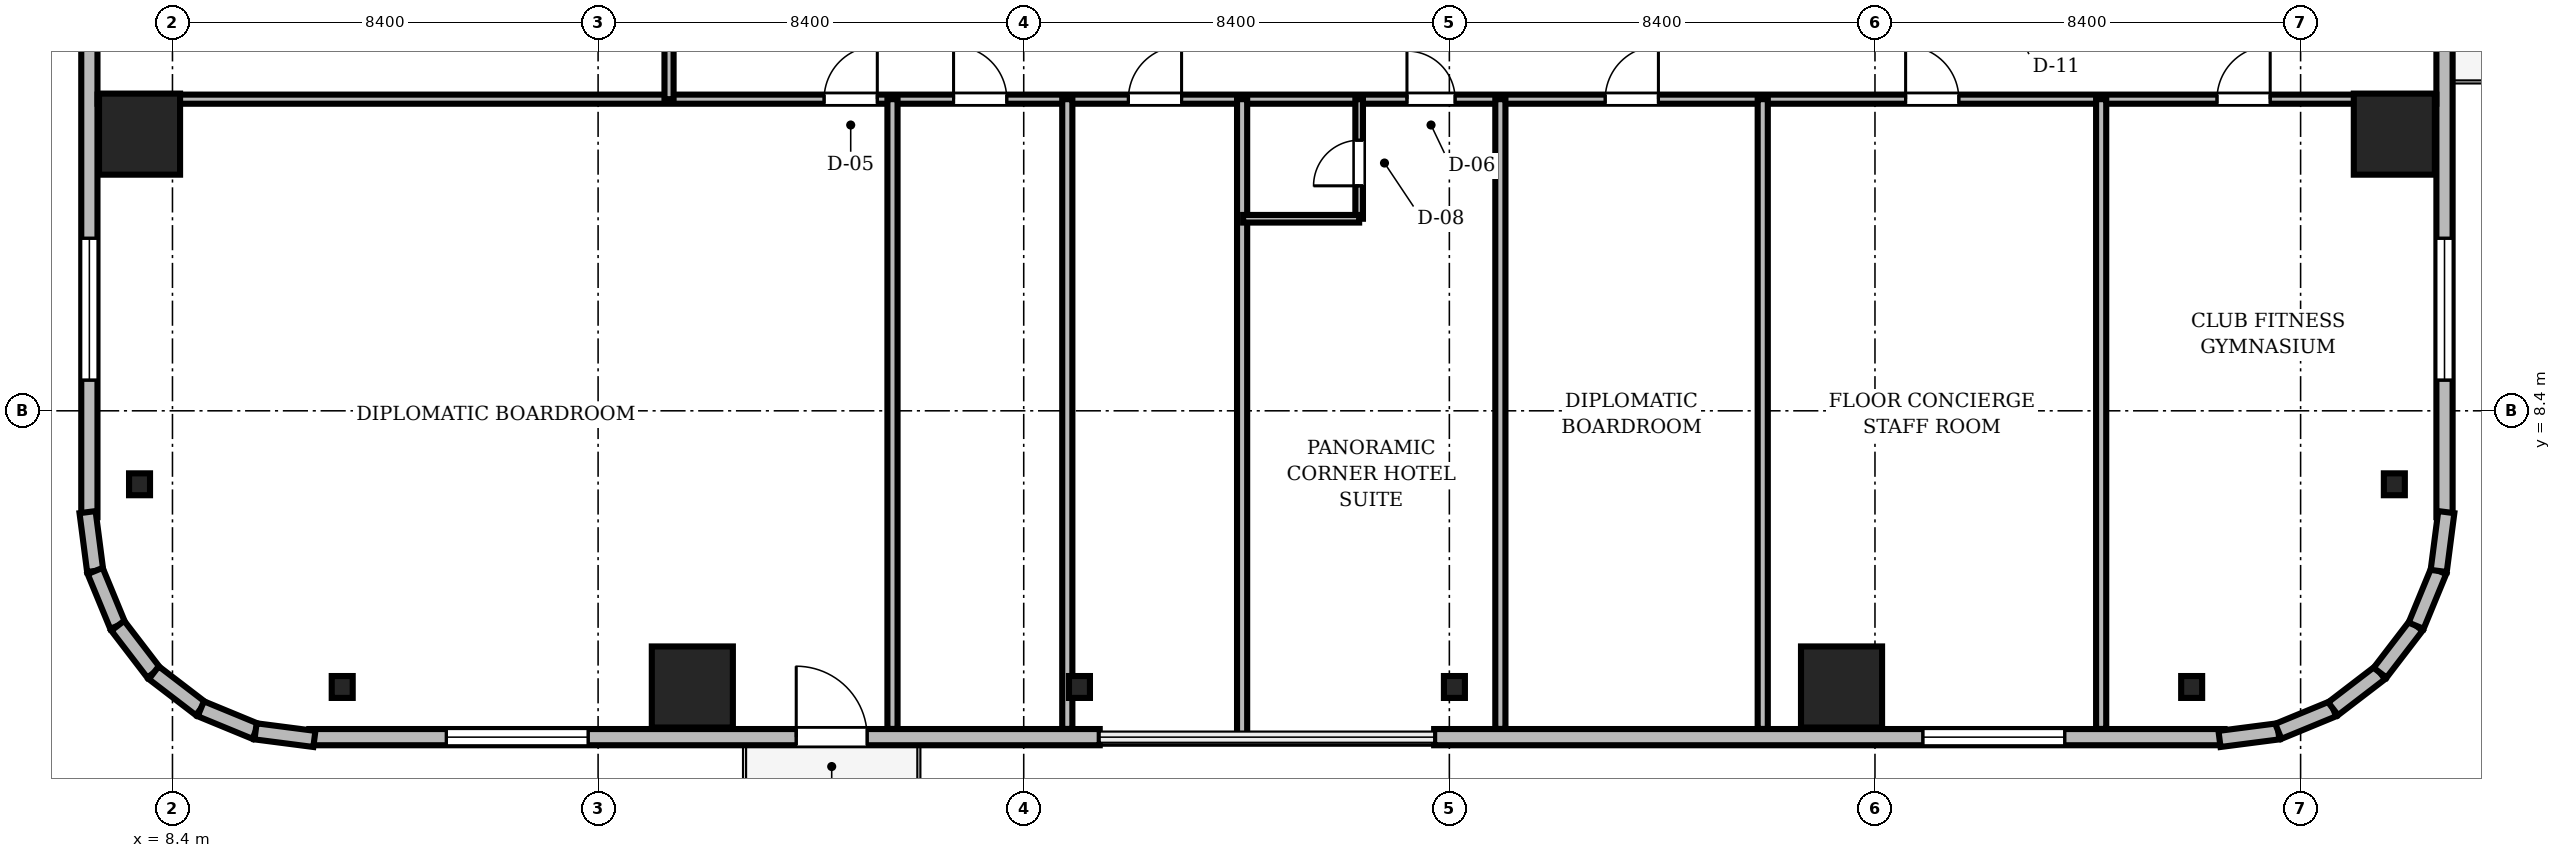
"""IFC4 building model, lengths in metres.
Left out: names, types, materials, properties, quantities, classifications, styles, units other than length and angle.
Written with IfcOpenShell. Run it as: python <this file> out.ifc"""

import sys

from ifc_helpers import new_model, si_unit, direction, frame, frame_2d, origin, origin_2d, place, context, subcontext, project, spatial, rectangle, i_section, extrude, source, transform, mapped, element, fill, save


model = new_model("IFC4")
c1 = context("Model", 3, precision=1e-05, world=origin(), true_north=direction((0.0, 1.0)))
c2 = subcontext(c1, "Body", "Model", "MODEL_VIEW")
j1 = project(units=[si_unit("LENGTHUNIT", "METRE"), si_unit("PLANEANGLEUNIT", "RADIAN")], contexts=[c1])
p1 = place(None, origin())
s1 = spatial("IfcSite", under=j1, at=p1, CompositionType="ELEMENT")
p2 = place(p1, origin())
s2 = spatial("IfcBuilding", under=s1, at=p2, CompositionType="ELEMENT")
p3 = place(p2, frame((0.0, 0.0, 103.7)))
s3 = spatial("IfcBuildingStorey", under=s2, at=p3, CompositionType="ELEMENT", Elevation=103.7)
m1 = source(origin(), c2, "Body", "SweptSolid", [
    extrude(rectangle(XDim=1.6, YDim=1.6, at=origin_2d()), origin(), (0.0, 0.0, 1.0), 3.56),
])
for number, where, z_axis, x_axis in (
    (1, (18.66, 2.95, 0.0), (0.0, 0.0, 1.0), (1.0, 0.0, 0.0)),
    (2, (41.34, 2.95, 0.0), (0.0, 0.0, 1.0), (1.0, 0.0, 0.0)),
    (3, (52.25, 13.86, 0.0), (0.0, 0.0, 1.0), (1.0, 0.0, 0.0)),
    (4, (7.75, 13.86, 0.0), (0.0, 0.0, 1.0), (1.0, 0.0, 0.0)),
):
    element("IfcColumn", number, at=place(p3, frame(where, z_axis=z_axis, x_axis=x_axis)), inside=s3, PredefinedType="COLUMN", context=c2, shape_type="MappedRepresentation", body=[
        mapped(m1, transform((0.0, 0.0, 0.0), scale=1.0)),
    ])
m2 = source(origin(), c2, "Body", "SweptSolid", [
    extrude(i_section(OverallWidth=0.414, OverallDepth=0.432, WebThickness=0.026, FlangeThickness=0.04, FilletRadius=0.015, at=origin_2d()), origin(), (0.0, 0.0, 1.0), 3.56),
])
for number, where, z_axis, x_axis in (
    (5, (11.75, 2.95, 0.0), (0.0, 0.0, 1.0), (1.0, 0.0, 0.0)),
    (6, (26.3, 2.95, 0.0), (0.0, 0.0, 1.0), (1.0, 0.0, 0.0)),
    (7, (33.7, 2.95, 0.0), (0.0, 0.0, 1.0), (1.0, 0.0, 0.0)),
    (8, (48.25, 2.95, 0.0), (0.0, 0.0, 1.0), (1.0, 0.0, 0.0)),
    (9, (52.25, 6.95, 0.0), (0.0, 0.0, 1.0), (1.0, 0.0, 0.0)),
    (10, (7.75, 6.95, 0.0), (0.0, 0.0, 1.0), (1.0, 0.0, 0.0)),
):
    element("IfcColumn", number, at=place(p3, frame(where, z_axis=z_axis, x_axis=x_axis)), inside=s3, PredefinedType="COLUMN", context=c2, shape_type="MappedRepresentation", body=[
        mapped(m2, transform((0.0, 0.0, 0.0), scale=1.0)),
    ])
m3 = source(origin(), c2, "Body", "SweptSolid", [
    extrude(rectangle(XDim=15.6, YDim=0.32, at=frame_2d((7.8, 0.0))), origin(), (0.0, 0.0, 1.0), 3.56),
])
p4 = place(p3, frame((11.1, 1.96, 0.0), z_axis=(0.0, 0.0, 1.0), x_axis=(1.0, 0.0, 0.0)))
e11 = element("IfcWall", 11, at=p4, inside=s3, PredefinedType="SOLIDWALL", context=c2, shape_type="MappedRepresentation", body=[
    mapped(m3, transform((0.0, 0.0, 0.0), scale=1.0)),
])
m4 = source(origin(), c2, "Body", "SweptSolid", [
    extrude(rectangle(XDim=1.4, YDim=2.3, at=frame_2d((0.7, 1.15))), frame((0.0, 0.17, 0.0), z_axis=(0.0, -1.0, 0.0), x_axis=(1.0, 0.0, 0.0)), (0.0, 0.0, 1.0), 0.34),
])
p5 = place(p4, frame((9.61, 0.0, 0.0)))
e12 = element("IfcOpeningElement", 12, at=p5, cuts=e11, PredefinedType="OPENING", context=c2, shape_type="MappedRepresentation", body=[
    mapped(m4, transform((0.0, 0.0, 0.0), scale=1.0)),
])
m5 = source(origin(), c2, "Body", "SweptSolid", [
    extrude(rectangle(XDim=2.8, YDim=2.4, at=frame_2d((1.4, 1.2))), frame((0.0, 0.17, 0.0), z_axis=(0.0, -1.0, 0.0), x_axis=(1.0, 0.0, 0.0)), (0.0, 0.0, 1.0), 0.34),
])
p6 = place(p4, frame((2.705, 0.0, 0.72)))
e13 = element("IfcOpeningElement", 13, at=p6, cuts=e11, PredefinedType="OPENING", context=c2, shape_type="MappedRepresentation", body=[
    mapped(m5, transform((0.0, 0.0, 0.0), scale=1.0)),
])
p7 = place(p3, frame((33.3, 1.96, 0.0), z_axis=(0.0, 0.0, 1.0), x_axis=(1.0, 0.0, 0.0)))
e14 = element("IfcWall", 14, at=p7, inside=s3, PredefinedType="SOLIDWALL", context=c2, shape_type="MappedRepresentation", body=[
    mapped(m3, transform((0.0, 0.0, 0.0), scale=1.0)),
])
p8 = place(p7, frame((9.645, 0.0, 0.72)))
e15 = element("IfcOpeningElement", 15, at=p8, cuts=e14, PredefinedType="OPENING", context=c2, shape_type="MappedRepresentation", body=[
    mapped(m5, transform((0.0, 0.0, 0.0), scale=1.0)),
])
p9 = place(p3, frame((6.76, 21.9, 0.0), z_axis=(0.0, 0.0, 1.0), x_axis=(0.0, -1.0, 0.0)))
e16 = element("IfcWall", 16, at=p9, inside=s3, PredefinedType="SOLIDWALL", context=c2, shape_type="MappedRepresentation", body=[
    mapped(m3, transform((0.0, 0.0, 0.0), scale=1.0)),
])
p10 = place(p9, frame((10.095, 0.0, 0.72)))
e17 = element("IfcOpeningElement", 17, at=p10, cuts=e16, PredefinedType="OPENING", context=c2, shape_type="MappedRepresentation", body=[
    mapped(m5, transform((0.0, 0.0, 0.0), scale=1.0)),
])
p11 = place(p3, frame((53.24, 6.3, 0.0), z_axis=(0.0, 0.0, 1.0), x_axis=(0.0, 1.0, 0.0)))
e18 = element("IfcWall", 18, at=p11, inside=s3, PredefinedType="SOLIDWALL", context=c2, shape_type="MappedRepresentation", body=[
    mapped(m3, transform((0.0, 0.0, 0.0), scale=1.0)),
])
p12 = place(p11, frame((9.61, 0.0, 0.0)))
e19 = element("IfcOpeningElement", 19, at=p12, cuts=e18, PredefinedType="OPENING", context=c2, shape_type="MappedRepresentation", body=[
    mapped(m4, transform((0.0, 0.0, 0.0), scale=1.0)),
])
p13 = place(p11, frame((2.705, 0.0, 0.72)))
e20 = element("IfcOpeningElement", 20, at=p13, cuts=e18, PredefinedType="OPENING", context=c2, shape_type="MappedRepresentation", body=[
    mapped(m5, transform((0.0, 0.0, 0.0), scale=1.0)),
])
m6 = source(origin(), c2, "Body", "SweptSolid", [
    extrude(rectangle(XDim=1.171, YDim=0.32, at=frame_2d((0.585, 0.0))), origin(), (0.0, 0.0, 1.0), 3.56),
])
p14 = place(p3, frame((6.724, 6.401, 0.0), z_axis=(0.0, 0.0, 1.0), x_axis=(0.128269133229, -0.991739395941, 0.0)))
e21 = element("IfcWall", 21, at=p14, inside=s3, PredefinedType="SOLIDWALL", context=c2, shape_type="MappedRepresentation", body=[
    mapped(m6, transform((0.0, 0.0, 0.0), scale=1.0)),
])
m7 = source(origin(), c2, "Body", "SweptSolid", [
    extrude(rectangle(XDim=1.169, YDim=0.32, at=frame_2d((0.584, 0.0))), origin(), (0.0, 0.0, 1.0), 3.56),
])
for number, where, z_axis, x_axis in (
    (22, (6.875, 5.24, 0.0), (0.0, 0.0, 1.0), (0.381, -0.925, 0.0)),
    (23, (7.32, 4.159, 0.0), (0.0, 0.0, 1.0), (0.608, -0.794, 0.0)),
):
    element("IfcWall", number, at=place(p3, frame(where, z_axis=z_axis, x_axis=x_axis)), inside=s3, PredefinedType="SOLIDWALL", context=c2, shape_type="MappedRepresentation", body=[
        mapped(m7, transform((0.0, 0.0, 0.0), scale=1.0)),
    ])
m8 = source(origin(), c2, "Body", "SweptSolid", [
    extrude(rectangle(XDim=1.169, YDim=0.32, at=frame_2d((0.584, 0.0))), origin(), (0.0, 0.0, 1.0), 3.56),
])
p15 = place(p3, frame((8.031, 3.231, 0.0), z_axis=(0.0, 0.0, 1.0), x_axis=(0.793663520347, -0.608356981114, 0.0)))
e24 = element("IfcWall", 24, at=p15, inside=s3, PredefinedType="SOLIDWALL", context=c2, shape_type="MappedRepresentation", body=[
    mapped(m8, transform((0.0, 0.0, 0.0), scale=1.0)),
])
m9 = source(origin(), c2, "Body", "SweptSolid", [
    extrude(rectangle(XDim=1.169, YDim=0.32, at=frame_2d((0.585, 0.0))), origin(), (0.0, 0.0, 1.0), 3.56),
])
p16 = place(p3, frame((8.959, 2.52, 0.0), z_axis=(0.0, 0.0, 1.0), x_axis=(0.924479075121, -0.381232789334, 0.0)))
e25 = element("IfcWall", 25, at=p16, inside=s3, PredefinedType="SOLIDWALL", context=c2, shape_type="MappedRepresentation", body=[
    mapped(m9, transform((0.0, 0.0, 0.0), scale=1.0)),
])
m10 = source(origin(), c2, "Body", "SweptSolid", [
    extrude(rectangle(XDim=1.17, YDim=0.32, at=frame_2d((0.585, 0.0))), origin(), (0.0, 0.0, 1.0), 3.56),
])
for number, where, z_axis, x_axis in (
    (26, (10.04, 2.074, 0.0), (0.0, 0.0, 1.0), (0.992, -0.128, 0.0)),
    (27, (48.8, 1.925, 0.0), (0.0, 0.0, 1.0), (0.992, 0.128, 0.0)),
):
    element("IfcWall", number, at=place(p3, frame(where, z_axis=z_axis, x_axis=x_axis)), inside=s3, PredefinedType="SOLIDWALL", context=c2, shape_type="MappedRepresentation", body=[
        mapped(m10, transform((0.0, 0.0, 0.0), scale=1.0)),
    ])
p17 = place(p3, frame((49.96, 2.074, 0.0), z_axis=(0.0, 0.0, 1.0), x_axis=(0.924479075121, 0.381232789334, 0.0)))
e28 = element("IfcWall", 28, at=p17, inside=s3, PredefinedType="SOLIDWALL", context=c2, shape_type="MappedRepresentation", body=[
    mapped(m9, transform((0.0, 0.0, 0.0), scale=1.0)),
])
p18 = place(p3, frame((51.041, 2.52, 0.0), z_axis=(0.0, 0.0, 1.0), x_axis=(0.793663520347, 0.608356981114, 0.0)))
e29 = element("IfcWall", 29, at=p18, inside=s3, PredefinedType="SOLIDWALL", context=c2, shape_type="MappedRepresentation", body=[
    mapped(m8, transform((0.0, 0.0, 0.0), scale=1.0)),
])
for number, where, z_axis, x_axis in (
    (30, (51.969, 3.231, 0.0), (0.0, 0.0, 1.0), (0.608, 0.794, 0.0)),
    (31, (52.68, 4.159, 0.0), (0.0, 0.0, 1.0), (0.381, 0.925, 0.0)),
):
    element("IfcWall", number, at=place(p3, frame(where, z_axis=z_axis, x_axis=x_axis)), inside=s3, PredefinedType="SOLIDWALL", context=c2, shape_type="MappedRepresentation", body=[
        mapped(m7, transform((0.0, 0.0, 0.0), scale=1.0)),
    ])
p19 = place(p3, frame((53.125, 5.24, 0.0), z_axis=(0.0, 0.0, 1.0), x_axis=(0.128269133229, 0.991739395941, 0.0)))
e32 = element("IfcWall", 32, at=p19, inside=s3, PredefinedType="SOLIDWALL", context=c2, shape_type="MappedRepresentation", body=[
    mapped(m6, transform((0.0, 0.0, 0.0), scale=1.0)),
])
m11 = source(origin(), c2, "Body", "SweptSolid", [
    extrude(rectangle(XDim=46.156, YDim=0.18, at=frame_2d((23.078, 0.0))), origin(), (0.0, 0.0, 1.0), 2.802),
])
p20 = place(p3, frame((6.922, 14.55, 0.0), z_axis=(0.0, 0.0, 1.0), x_axis=(1.0, 0.0, 0.0)))
e33 = element("IfcWall", 33, at=p20, inside=s3, PredefinedType="PARTITIONING", context=c2, shape_type="MappedRepresentation", body=[
    mapped(m11, transform((0.0, 0.0, 0.0), scale=1.0)),
])
m12 = source(origin(), c2, "Body", "SweptSolid", [
    extrude(rectangle(XDim=1.05, YDim=2.2, at=frame_2d((0.525, 1.1))), frame((0.0, 0.1, 0.0), z_axis=(0.0, -1.0, 0.0), x_axis=(1.0, 0.0, 0.0)), (0.0, 0.0, 1.0), 0.2),
])
p21 = place(p20, frame((14.338, 0.0, 0.0)))
e34 = element("IfcOpeningElement", 34, at=p21, cuts=e33, PredefinedType="OPENING", context=c2, shape_type="MappedRepresentation", body=[
    mapped(m12, transform((0.0, 0.0, 0.0), scale=1.0)),
])
p22 = place(p20, frame((16.893, 0.0, 0.0)))
e35 = element("IfcOpeningElement", 35, at=p22, cuts=e33, PredefinedType="OPENING", context=c2, shape_type="MappedRepresentation", body=[
    mapped(m12, transform((0.0, 0.0, 0.0), scale=1.0)),
])
p23 = place(p20, frame((20.344, 0.0, 0.0)))
e36 = element("IfcOpeningElement", 36, at=p23, cuts=e33, PredefinedType="OPENING", context=c2, shape_type="MappedRepresentation", body=[
    mapped(m12, transform((0.0, 0.0, 0.0), scale=1.0)),
])
m13 = source(origin(), c2, "Body", "SweptSolid", [
    extrude(rectangle(XDim=0.95, YDim=2.15, at=frame_2d((0.475, 1.075))), frame((0.0, 0.1, 0.0), z_axis=(0.0, -1.0, 0.0), x_axis=(1.0, 0.0, 0.0)), (0.0, 0.0, 1.0), 0.2),
])
p24 = place(p20, frame((25.842, 0.0, 0.0)))
e37 = element("IfcOpeningElement", 37, at=p24, cuts=e33, PredefinedType="OPENING", context=c2, shape_type="MappedRepresentation", body=[
    mapped(m13, transform((0.0, 0.0, 0.0), scale=1.0)),
])
p25 = place(p20, frame((29.754, 0.0, 0.0)))
e38 = element("IfcOpeningElement", 38, at=p25, cuts=e33, PredefinedType="OPENING", context=c2, shape_type="MappedRepresentation", body=[
    mapped(m12, transform((0.0, 0.0, 0.0), scale=1.0)),
])
p26 = place(p20, frame((35.683, 0.0, 0.0)))
e39 = element("IfcOpeningElement", 39, at=p26, cuts=e33, PredefinedType="OPENING", context=c2, shape_type="MappedRepresentation", body=[
    mapped(m12, transform((0.0, 0.0, 0.0), scale=1.0)),
])
p27 = place(p20, frame((41.828, 0.0, 0.0)))
e40 = element("IfcOpeningElement", 40, at=p27, cuts=e33, PredefinedType="OPENING", context=c2, shape_type="MappedRepresentation", body=[
    mapped(m12, transform((0.0, 0.0, 0.0), scale=1.0)),
])
m14 = source(origin(), c2, "Body", "SweptSolid", [
    extrude(rectangle(XDim=2.36, YDim=0.15, at=frame_2d((1.18, 0.0))), origin(), (0.0, 0.0, 1.0), 3.56),
])
p28 = place(p3, frame((31.82, 12.19, 0.0), z_axis=(0.0, 0.0, 1.0), x_axis=(0.0, 1.0, 0.0)))
e41 = element("IfcWall", 41, at=p28, inside=s3, PredefinedType="PARTITIONING", context=c2, shape_type="MappedRepresentation", body=[
    mapped(m14, transform((0.0, 0.0, 0.0), scale=1.0)),
])
m15 = source(origin(), c2, "Body", "SweptSolid", [
    extrude(rectangle(XDim=0.9, YDim=2.1, at=frame_2d((0.45, 1.05))), frame((0.0, 0.085, 0.0), z_axis=(0.0, -1.0, 0.0), x_axis=(1.0, 0.0, 0.0)), (0.0, 0.0, 1.0), 0.17),
])
p29 = place(p28, frame((0.65, 0.0, 0.0)))
e42 = element("IfcOpeningElement", 42, at=p29, cuts=e41, PredefinedType="OPENING", context=c2, shape_type="MappedRepresentation", body=[
    mapped(m15, transform((0.0, 0.0, 0.0), scale=1.0)),
])
m16 = source(origin(), c2, "Body", "SweptSolid", [
    extrude(rectangle(XDim=14.0, YDim=0.18, at=frame_2d((7.0, 0.0))), origin(), (0.0, 0.0, 1.0), 2.952),
])
p30 = place(p3, frame((18.2, 14.55, 0.0), z_axis=(0.0, 0.0, 1.0), x_axis=(0.0, 1.0, 0.0)))
e43 = element("IfcWall", 43, at=p30, inside=s3, PredefinedType="PARTITIONING", context=c2, shape_type="MappedRepresentation", body=[
    mapped(m16, transform((0.0, 0.0, 0.0), scale=1.0)),
])
m17 = source(origin(), c2, "Body", "SweptSolid", [
    extrude(rectangle(XDim=12.428, YDim=0.2, at=frame_2d((6.214, 0.0))), origin(), (0.0, 0.0, 1.0), 2.802),
])
for number, where, z_axis, x_axis in (
    (44, (22.61, 2.122, 0.0), (0.0, 0.0, 1.0), (0.0, 1.0, 0.0)),
    (45, (26.06, 2.122, 0.0), (0.0, 0.0, 1.0), (0.0, 1.0, 0.0)),
):
    element("IfcWall", number, at=place(p3, frame(where, z_axis=z_axis, x_axis=x_axis)), inside=s3, PredefinedType="PARTITIONING", context=c2, shape_type="MappedRepresentation", body=[
        mapped(m17, transform((0.0, 0.0, 0.0), scale=1.0)),
    ])
m18 = source(origin(), c2, "Body", "SweptSolid", [
    extrude(rectangle(XDim=12.62, YDim=0.2, at=frame_2d((6.31, 0.0))), origin(), (0.0, 0.0, 1.0), 2.802),
])
p31 = place(p3, frame((29.51, 1.93, 0.0), z_axis=(0.0, 0.0, 1.0), x_axis=(0.0, 1.0, 0.0)))
e46 = element("IfcWall", 46, at=p31, inside=s3, PredefinedType="PARTITIONING", context=c2, shape_type="MappedRepresentation", body=[
    mapped(m18, transform((0.0, 0.0, 0.0), scale=1.0)),
])
for number, where, z_axis, x_axis in (
    (47, (34.607, 2.122, 0.0), (0.0, 0.0, 1.0), (0.0, 1.0, 0.0)),
    (48, (39.785, 2.122, 0.0), (0.0, 0.0, 1.0), (0.0, 1.0, 0.0)),
    (49, (46.464, 2.122, 0.0), (0.0, 0.0, 1.0), (0.0, 1.0, 0.0)),
):
    element("IfcWall", number, at=place(p3, frame(where, z_axis=z_axis, x_axis=x_axis)), inside=s3, PredefinedType="PARTITIONING", context=c2, shape_type="MappedRepresentation", body=[
        mapped(m17, transform((0.0, 0.0, 0.0), scale=1.0)),
    ])
m19 = source(origin(), c2, "Body", "SweptSolid", [
    extrude(rectangle(XDim=2.29, YDim=0.15, at=frame_2d((1.145, 0.0))), origin(), (0.0, 0.0, 1.0), 2.952),
])
p32 = place(p3, frame((29.53, 12.19, 0.0), z_axis=(0.0, 0.0, 1.0), x_axis=(1.0, 0.0, 0.0)))
e50 = element("IfcWall", 50, at=p32, inside=s3, PredefinedType="PARTITIONING", context=c2, shape_type="MappedRepresentation", body=[
    mapped(m19, transform((0.0, 0.0, 0.0), scale=1.0)),
])
m20 = source(origin(), c2, "Body", "SweptSolid", [
    extrude(rectangle(XDim=1.4, YDim=2.3, at=frame_2d((0.7, 1.15))), frame((0.0, 0.025, 0.0), z_axis=(0.0, -1.0, 0.0), x_axis=(1.0, 0.0, 0.0)), (0.0, 0.0, 1.0), 0.05),
])
p33 = place(p5, frame((1.4, 0.0, 0.0), z_axis=(0.0, 0.0, 1.0), x_axis=(-1.0, 0.0, 0.0)))
e51 = element("IfcDoor", 51, at=p33, inside=s3, OperationType="DOUBLE_DOOR_SLIDING", PredefinedType="DOOR", context=c2, shape_type="MappedRepresentation", body=[
    mapped(m20, transform((0.0, 0.0, 0.0), scale=1.0)),
])
fill(e12, e51)
m21 = source(origin(), c2, "Body", "SweptSolid", [
    extrude(rectangle(XDim=2.8, YDim=2.4, at=frame_2d((1.4, 1.2))), frame((0.0, 0.03, 0.0), z_axis=(0.0, -1.0, 0.0), x_axis=(1.0, 0.0, 0.0)), (0.0, 0.0, 1.0), 0.06),
])
p34 = place(p6, origin())
e52 = element("IfcWindow", 52, at=p34, inside=s3, PartitioningType="SINGLE_PANEL", PredefinedType="WINDOW", context=c2, shape_type="MappedRepresentation", body=[
    mapped(m21, transform((0.0, 0.0, 0.0), scale=1.0)),
])
fill(e13, e52)
p35 = place(p8, origin())
e53 = element("IfcWindow", 53, at=p35, inside=s3, PartitioningType="SINGLE_PANEL", PredefinedType="WINDOW", context=c2, shape_type="MappedRepresentation", body=[
    mapped(m21, transform((0.0, 0.0, 0.0), scale=1.0)),
])
fill(e15, e53)
p36 = place(p10, origin())
e54 = element("IfcWindow", 54, at=p36, inside=s3, PartitioningType="SINGLE_PANEL", PredefinedType="WINDOW", context=c2, shape_type="MappedRepresentation", body=[
    mapped(m21, transform((0.0, 0.0, 0.0), scale=1.0)),
])
fill(e17, e54)
p37 = place(p13, origin())
e55 = element("IfcWindow", 55, at=p37, inside=s3, PartitioningType="SINGLE_PANEL", PredefinedType="WINDOW", context=c2, shape_type="MappedRepresentation", body=[
    mapped(m21, transform((0.0, 0.0, 0.0), scale=1.0)),
])
fill(e20, e55)
m22 = source(origin(), c2, "Body", "SweptSolid", [
    extrude(rectangle(XDim=1.05, YDim=2.2, at=frame_2d((0.525, 1.1))), frame((0.0, 0.025, 0.0), z_axis=(0.0, -1.0, 0.0), x_axis=(1.0, 0.0, 0.0)), (0.0, 0.0, 1.0), 0.05),
])
p38 = place(p21, origin())
e56 = element("IfcDoor", 56, at=p38, inside=s3, OperationType="SINGLE_SWING_RIGHT", PredefinedType="DOOR", context=c2, shape_type="MappedRepresentation", body=[
    mapped(m22, transform((0.0, 0.0, 0.0), scale=1.0)),
])
fill(e34, e56)
p39 = place(p22, origin())
e57 = element("IfcDoor", 57, at=p39, inside=s3, OperationType="SINGLE_SWING_LEFT", PredefinedType="DOOR", context=c2, shape_type="MappedRepresentation", body=[
    mapped(m22, transform((0.0, 0.0, 0.0), scale=1.0)),
])
fill(e35, e57)
p40 = place(p23, origin())
e58 = element("IfcDoor", 58, at=p40, inside=s3, OperationType="SINGLE_SWING_RIGHT", PredefinedType="DOOR", context=c2, shape_type="MappedRepresentation", body=[
    mapped(m22, transform((0.0, 0.0, 0.0), scale=1.0)),
])
fill(e36, e58)
m23 = source(origin(), c2, "Body", "SweptSolid", [
    extrude(rectangle(XDim=0.95, YDim=2.15, at=frame_2d((0.475, 1.075))), frame((0.0, 0.025, 0.0), z_axis=(0.0, -1.0, 0.0), x_axis=(1.0, 0.0, 0.0)), (0.0, 0.0, 1.0), 0.05),
])
p41 = place(p24, origin())
e59 = element("IfcDoor", 59, at=p41, inside=s3, OperationType="SINGLE_SWING_LEFT", PredefinedType="DOOR", context=c2, shape_type="MappedRepresentation", body=[
    mapped(m23, transform((0.0, 0.0, 0.0), scale=1.0)),
])
fill(e37, e59)
p42 = place(p25, origin())
e60 = element("IfcDoor", 60, at=p42, inside=s3, OperationType="SINGLE_SWING_RIGHT", PredefinedType="DOOR", context=c2, shape_type="MappedRepresentation", body=[
    mapped(m22, transform((0.0, 0.0, 0.0), scale=1.0)),
])
fill(e38, e60)
p43 = place(p26, origin())
e61 = element("IfcDoor", 61, at=p43, inside=s3, OperationType="SINGLE_SWING_LEFT", PredefinedType="DOOR", context=c2, shape_type="MappedRepresentation", body=[
    mapped(m22, transform((0.0, 0.0, 0.0), scale=1.0)),
])
fill(e39, e61)
p44 = place(p27, origin())
e62 = element("IfcDoor", 62, at=p44, inside=s3, OperationType="SINGLE_SWING_RIGHT", PredefinedType="DOOR", context=c2, shape_type="MappedRepresentation", body=[
    mapped(m22, transform((0.0, 0.0, 0.0), scale=1.0)),
])
fill(e40, e62)
m24 = source(origin(), c2, "Body", "SweptSolid", [
    extrude(rectangle(XDim=0.9, YDim=2.1, at=frame_2d((0.45, 1.05))), frame((0.0, 0.025, 0.0), z_axis=(0.0, -1.0, 0.0), x_axis=(1.0, 0.0, 0.0)), (0.0, 0.0, 1.0), 0.05),
])
p45 = place(p29, origin())
e63 = element("IfcDoor", 63, at=p45, inside=s3, OperationType="SINGLE_SWING_LEFT", PredefinedType="DOOR", context=c2, shape_type="MappedRepresentation", body=[
    mapped(m24, transform((0.0, 0.0, 0.0), scale=1.0)),
])
fill(e42, e63)
save(model, sys.argv[1])
